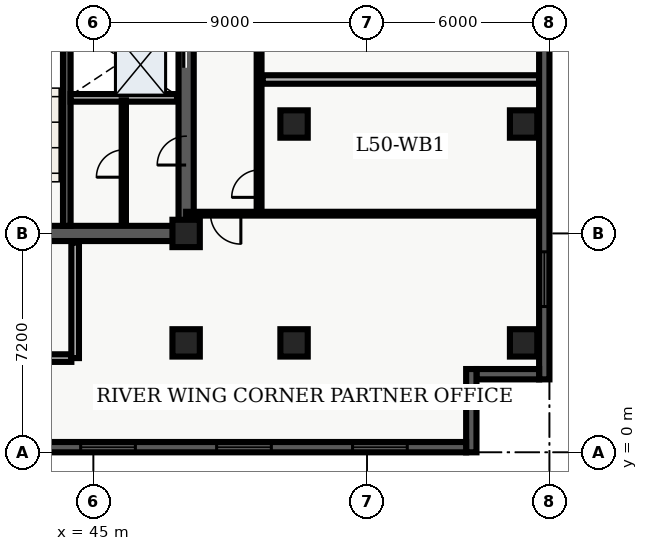
"""IFC4 building model, lengths in metres.
Left out: names, types, materials, properties, quantities, classifications, styles, units other than length and angle.
Written with IfcOpenShell. Run it as: python <this file> out.ifc"""

import sys

from ifc_helpers import new_model, entity, si_unit, converted_unit, direction, frame, origin_with_axes, origin_2d_with_axis, place, context, subcontext, project, spatial, polyline, rectangle, outline, extrude, element, fill, save


model = new_model("IFC4")
c1 = context("Model", 3, precision=1e-05, world=origin_with_axes(), true_north=direction((0.0, 1.0)))
c2 = subcontext(c1, "Body", "Model", "MODEL_VIEW")
j1 = project(units=[si_unit("LENGTHUNIT", "METRE"), converted_unit("PLANEANGLEUNIT", "DEGREE", entity("IfcPlaneAngleMeasure", 0.017), si_unit("PLANEANGLEUNIT", "RADIAN"), dimensions=[0, 0, 0, 0, 0, 0, 0])], contexts=[c1])
p1 = place(None, origin_with_axes())
s1 = spatial("IfcSite", under=j1, at=p1, CompositionType="ELEMENT")
p2 = place(p1, origin_with_axes())
s2 = spatial("IfcBuilding", under=s1, at=p2, CompositionType="ELEMENT")
p3 = place(p2, frame((0.0, 0.0, 204.3), z_axis=(0.0, 0.0, 1.0), x_axis=(1.0, 0.0, 0.0)))
s3 = spatial("IfcBuildingStorey", under=s2, at=p3, CompositionType="ELEMENT", Elevation=204.3)
p4 = place(p3, frame((40.2, 7.2, 0.0), z_axis=(0.0, 0.0, 1.0), x_axis=(1.0, 0.0, 0.0)))
e1 = element("IfcWall", 1, at=p4, inside=s3, PredefinedType="SHEAR", context=c2, shape_type="SweptSolid", body=[
    extrude(outline(polyline([(0.0, -0.25), (7.85, -0.25), (7.85, 0.25), (0.0, 0.25), (0.0, -0.25)])), origin_with_axes(), (0.0, 0.0, 1.0), 3.66),
])
p5 = place(p4, frame((2.175, 0.0, 0.0), z_axis=(0.0, 0.0, 1.0), x_axis=(1.0, 0.0, 0.0)))
e2 = element("IfcOpeningElement", 2, at=p5, cuts=e1, PredefinedType="OPENING", context=c2, shape_type="SweptSolid", body=[
    extrude(rectangle(XDim=1.05, YDim=0.52, at=origin_2d_with_axis()), origin_with_axes(), (0.0, 0.0, 1.0), 2.15),
])
p6 = place(p3, frame((48.05, 7.2, 0.0), z_axis=(0.0, 0.0, 1.0), x_axis=(0.0, 1.0, 0.0)))
e3 = element("IfcWall", 3, at=p6, inside=s3, PredefinedType="SHEAR", context=c2, shape_type="SweptSolid", body=[
    extrude(outline(polyline([(0.0, -0.25), (15.6, -0.25), (15.6, 0.25), (0.0, 0.25), (0.0, -0.25)])), origin_with_axes(), (0.0, 0.0, 1.0), 3.66),
])
p7 = place(p6, frame((5.975, 0.0, 0.0), z_axis=(0.0, 0.0, 1.0), x_axis=(1.0, 0.0, 0.0)))
e4 = element("IfcOpeningElement", 4, at=p7, cuts=e3, PredefinedType="OPENING", context=c2, shape_type="SweptSolid", body=[
    extrude(rectangle(XDim=1.05, YDim=0.52, at=origin_2d_with_axis()), origin_with_axes(), (0.0, 0.0, 1.0), 2.15),
])
p8 = place(p6, frame((2.725, 0.0, 0.0), z_axis=(0.0, 0.0, 1.0), x_axis=(1.0, 0.0, 0.0)))
e5 = element("IfcOpeningElement", 5, at=p8, cuts=e3, PredefinedType="OPENING", context=c2, shape_type="SweptSolid", body=[
    extrude(rectangle(XDim=0.95, YDim=0.52, at=origin_2d_with_axis()), origin_with_axes(), (0.0, 0.0, 1.0), 2.15),
])
p9 = place(p3, frame((44.125, 7.45, 0.0), z_axis=(0.0, 0.0, 1.0), x_axis=(0.0, 1.0, 0.0)))
e6 = element("IfcWall", 6, at=p9, inside=s3, PredefinedType="SHEAR", context=c2, shape_type="SweptSolid", body=[
    extrude(outline(polyline([(0.0, -0.125), (15.1, -0.125), (15.1, 0.125), (0.0, 0.125), (0.0, -0.125)])), origin_with_axes(), (0.0, 0.0, 1.0), 3.66),
])
p10 = place(p3, frame((40.325, 3.1, 0.0), z_axis=(0.0, 0.0, 1.0), x_axis=(1.0, 0.0, 0.0)))
e7 = element("IfcWall", 7, at=p10, inside=s3, PredefinedType="SOLIDWALL", context=c2, shape_type="SweptSolid", body=[
    extrude(outline(polyline([(0.0, -0.125), (3.95, -0.125), (3.95, 0.125), (0.0, 0.125), (0.0, -0.125)])), origin_with_axes(), (0.0, 0.0, 1.0), 2.7),
])
p11 = place(p3, frame((44.4, 3.1, 0.0), z_axis=(0.0, 0.0, 1.0), x_axis=(0.0, 1.0, 0.0)))
e8 = element("IfcWall", 8, at=p11, inside=s3, PredefinedType="SOLIDWALL", context=c2, shape_type="SweptSolid", body=[
    extrude(outline(polyline([(0.0, -0.125), (3.8, -0.125), (3.8, 0.125), (0.0, 0.125), (0.0, -0.125)])), origin_with_axes(), (0.0, 0.0, 1.0), 2.7),
])
for number, where, z_axis, x_axis in (
    (9, (48.05, 3.6, 0.0), (0.0, 0.0, 1.0), (1.0, 0.0, 0.0)),
    (10, (48.05, 7.2, 0.0), (0.0, 0.0, 1.0), (1.0, 0.0, 0.0)),
    (11, (51.6, 3.6, 0.0), (0.0, 0.0, 1.0), (1.0, 0.0, 0.0)),
    (12, (51.6, 10.8, 0.0), (0.0, 0.0, 1.0), (1.0, 0.0, 0.0)),
    (13, (59.15, 3.6, 0.0), (0.0, 0.0, 1.0), (1.0, 0.0, 0.0)),
    (14, (59.15, 10.8, 0.0), (0.0, 0.0, 1.0), (1.0, 0.0, 0.0)),
):
    element("IfcColumn", number, at=place(p3, frame(where, z_axis=z_axis, x_axis=x_axis)), inside=s3, PredefinedType="COLUMN", context=c2, shape_type="SweptSolid", body=[
        extrude(rectangle(XDim=0.9, YDim=0.9, at=origin_2d_with_axis()), origin_with_axes(), (0.0, 0.0, 1.0), 3.9),
    ])
p12 = place(p3, frame((44.25, 11.66, 0.0), z_axis=(0.0, 0.0, 1.0), x_axis=(1.0, 0.0, 0.0)))
e15 = element("IfcWall", 15, at=p12, inside=s3, PredefinedType="SOLIDWALL", context=c2, shape_type="SweptSolid", body=[
    extrude(outline(polyline([(0.0, -0.125), (3.5, -0.125), (3.5, 0.125), (0.0, 0.125), (0.0, -0.125)])), origin_with_axes(), (0.0, 0.0, 1.0), 2.7),
])
p13 = place(p3, frame((46.0, 7.5, 0.0), z_axis=(0.0, 0.0, 1.0), x_axis=(0.0, 1.0, 0.0)))
e16 = element("IfcWall", 16, at=p13, inside=s3, PredefinedType="PARTITIONING", context=c2, shape_type="SweptSolid", body=[
    extrude(outline(polyline([(0.0, -0.07), (4.08, -0.07), (4.08, 0.07), (0.0, 0.07), (0.0, -0.07)])), origin_with_axes(), (0.0, 0.0, 1.0), 2.7),
])
p14 = place(p13, frame((2.0, 0.0, 0.0), z_axis=(0.0, 0.0, 1.0), x_axis=(1.0, 0.0, 0.0)))
e17 = element("IfcOpeningElement", 17, at=p14, cuts=e16, PredefinedType="OPENING", context=c2, shape_type="SweptSolid", body=[
    extrude(rectangle(XDim=0.9, YDim=0.16, at=origin_2d_with_axis()), origin_with_axes(), (0.0, 0.0, 1.0), 2.15),
])
p15 = place(p3, frame((50.45, 7.85, 0.0), z_axis=(0.0, 0.0, 1.0), x_axis=(0.0, 1.0, 0.0)))
e18 = element("IfcWall", 18, at=p15, inside=s3, PredefinedType="PARTITIONING", context=c2, shape_type="SweptSolid", body=[
    extrude(outline(polyline([(0.0, -0.08), (18.8, -0.08), (18.8, 0.08), (0.0, 0.08), (0.0, -0.08)])), origin_with_axes(), (0.0, 0.0, 1.0), 2.7),
])
p16 = place(p15, frame((0.987, 0.0, 0.0), z_axis=(0.0, 0.0, 1.0), x_axis=(1.0, 0.0, 0.0)))
e19 = element("IfcOpeningElement", 19, at=p16, cuts=e18, PredefinedType="OPENING", context=c2, shape_type="SweptSolid", body=[
    extrude(rectangle(XDim=0.9, YDim=0.18, at=origin_2d_with_axis()), origin_with_axes(), (0.0, 0.0, 1.0), 2.15),
])
p17 = place(p15, frame((6.94, 0.0, 0.0), z_axis=(0.0, 0.0, 1.0), x_axis=(1.0, 0.0, 0.0)))
e20 = element("IfcOpeningElement", 20, at=p17, cuts=e18, PredefinedType="OPENING", context=c2, shape_type="SweptSolid", body=[
    extrude(rectangle(XDim=1.0, YDim=0.18, at=origin_2d_with_axis()), origin_with_axes(), (0.0, 0.0, 1.0), 2.15),
])
p18 = place(p15, frame((12.38, 0.0, 0.0), z_axis=(0.0, 0.0, 1.0), x_axis=(1.0, 0.0, 0.0)))
e21 = element("IfcOpeningElement", 21, at=p18, cuts=e18, PredefinedType="OPENING", context=c2, shape_type="SweptSolid", body=[
    extrude(rectangle(XDim=1.0, YDim=0.18, at=origin_2d_with_axis()), origin_with_axes(), (0.0, 0.0, 1.0), 2.15),
])
p19 = place(p15, frame((17.576, 0.0, 0.0), z_axis=(0.0, 0.0, 1.0), x_axis=(1.0, 0.0, 0.0)))
e22 = element("IfcOpeningElement", 22, at=p19, cuts=e18, PredefinedType="OPENING", context=c2, shape_type="SweptSolid", body=[
    extrude(rectangle(XDim=1.0, YDim=0.18, at=origin_2d_with_axis()), origin_with_axes(), (0.0, 0.0, 1.0), 2.15),
])
p20 = place(p3, frame((59.665, 7.85, 0.0), z_axis=(0.0, 0.0, 1.0), x_axis=(-1.0, 0.0, 0.0)))
e23 = element("IfcWall", 23, at=p20, inside=s3, PredefinedType="PARTITIONING", context=c2, shape_type="SweptSolid", body=[
    extrude(outline(polyline([(0.0, -0.062), (11.615, -0.062), (11.615, 0.062), (0.0, 0.062), (0.0, -0.062)])), origin_with_axes(), (0.0, 0.0, 1.0), 2.7),
])
p21 = place(p20, frame((10.315, 0.0, 0.0), z_axis=(0.0, 0.0, 1.0), x_axis=(1.0, 0.0, 0.0)))
e24 = element("IfcOpeningElement", 24, at=p21, cuts=e23, PredefinedType="OPENING", context=c2, shape_type="SweptSolid", body=[
    extrude(rectangle(XDim=1.0, YDim=0.145, at=origin_2d_with_axis()), origin_with_axes(), (0.0, 0.0, 1.0), 2.15),
])
p22 = place(p3, frame((50.57, 12.264, 0.0), z_axis=(0.0, 0.0, 1.0), x_axis=(1.0, 0.0, 0.0)))
e25 = element("IfcWall", 25, at=p22, inside=s3, PredefinedType="PARTITIONING", context=c2, shape_type="SweptSolid", body=[
    extrude(outline(polyline([(0.0, -0.14), (9.095, -0.14), (9.095, 0.14), (0.0, 0.14), (0.0, -0.14)])), origin_with_axes(), (0.0, 0.0, 1.0), 2.7),
])
p23 = place(p3, frame((59.83, 26.06, 0.0), z_axis=(0.0, 0.0, 1.0), x_axis=(0.0, -1.0, 0.0)))
e26 = element("IfcWall", 26, at=p23, inside=s3, PredefinedType="SOLIDWALL", context=c2, shape_type="SweptSolid", body=[
    extrude(outline(polyline([(0.0, -0.17), (23.66, -0.17), (23.66, 0.17), (0.0, 0.17), (0.0, -0.17)])), origin_with_axes(), (0.0, 0.0, 1.0), 3.66),
])
p24 = place(p23, frame((11.83, 0.0, 0.45), z_axis=(0.0, 0.0, 1.0), x_axis=(1.0, 0.0, 0.0)))
e27 = element("IfcOpeningElement", 27, at=p24, cuts=e26, PredefinedType="OPENING", context=c2, shape_type="SweptSolid", body=[
    extrude(rectangle(XDim=1.8, YDim=0.36, at=origin_2d_with_axis()), origin_with_axes(), (0.0, 0.0, 1.0), 2.1),
])
p25 = place(p23, frame((20.364, 0.0, 0.45), z_axis=(0.0, 0.0, 1.0), x_axis=(1.0, 0.0, 0.0)))
e28 = element("IfcOpeningElement", 28, at=p25, cuts=e26, PredefinedType="OPENING", context=c2, shape_type="SweptSolid", body=[
    extrude(rectangle(XDim=1.8, YDim=0.36, at=origin_2d_with_axis()), origin_with_axes(), (0.0, 0.0, 1.0), 2.1),
])
p26 = place(p3, frame((59.66, 2.57, 0.0), z_axis=(0.0, 0.0, 1.0), x_axis=(-1.0, 0.0, 0.0)))
e29 = element("IfcWall", 29, at=p26, inside=s3, PredefinedType="SOLIDWALL", context=c2, shape_type="SweptSolid", body=[
    extrude(outline(polyline([(0.0, -0.17), (2.06, -0.17), (2.06, 0.17), (0.0, 0.17), (0.0, -0.17)])), origin_with_axes(), (0.0, 0.0, 1.0), 3.66),
])
p27 = place(p3, frame((57.43, 2.74, 0.0), z_axis=(0.0, 0.0, 1.0), x_axis=(0.0, -1.0, 0.0)))
e30 = element("IfcWall", 30, at=p27, inside=s3, PredefinedType="SOLIDWALL", context=c2, shape_type="SweptSolid", body=[
    extrude(outline(polyline([(0.0, -0.17), (2.74, -0.17), (2.74, 0.17), (0.0, 0.17), (0.0, -0.17)])), origin_with_axes(), (0.0, 0.0, 1.0), 3.66),
])
p28 = place(p3, frame((57.26, 0.17, 0.0), z_axis=(0.0, 0.0, 1.0), x_axis=(-1.0, 0.0, 0.0)))
e31 = element("IfcWall", 31, at=p28, inside=s3, PredefinedType="SOLIDWALL", context=c2, shape_type="SweptSolid", body=[
    extrude(outline(polyline([(0.0, -0.17), (54.86, -0.17), (54.86, 0.17), (0.0, 0.17), (0.0, -0.17)])), origin_with_axes(), (0.0, 0.0, 1.0), 3.66),
])
p29 = place(p28, frame((2.836, 0.0, 0.45), z_axis=(0.0, 0.0, 1.0), x_axis=(1.0, 0.0, 0.0)))
e32 = element("IfcOpeningElement", 32, at=p29, cuts=e31, PredefinedType="OPENING", context=c2, shape_type="SweptSolid", body=[
    extrude(rectangle(XDim=1.8, YDim=0.36, at=origin_2d_with_axis()), origin_with_axes(), (0.0, 0.0, 1.0), 2.1),
])
p30 = place(p28, frame((7.307, 0.0, 0.45), z_axis=(0.0, 0.0, 1.0), x_axis=(1.0, 0.0, 0.0)))
e33 = element("IfcOpeningElement", 33, at=p30, cuts=e31, PredefinedType="OPENING", context=c2, shape_type="SweptSolid", body=[
    extrude(rectangle(XDim=1.8, YDim=0.36, at=origin_2d_with_axis()), origin_with_axes(), (0.0, 0.0, 1.0), 2.1),
])
p31 = place(p28, frame((11.779, 0.0, 0.45), z_axis=(0.0, 0.0, 1.0), x_axis=(1.0, 0.0, 0.0)))
e34 = element("IfcOpeningElement", 34, at=p31, cuts=e31, PredefinedType="OPENING", context=c2, shape_type="SweptSolid", body=[
    extrude(rectangle(XDim=1.8, YDim=0.36, at=origin_2d_with_axis()), origin_with_axes(), (0.0, 0.0, 1.0), 2.1),
])
p32 = place(p28, frame((16.251, 0.0, 0.45), z_axis=(0.0, 0.0, 1.0), x_axis=(1.0, 0.0, 0.0)))
e35 = element("IfcOpeningElement", 35, at=p32, cuts=e31, PredefinedType="OPENING", context=c2, shape_type="SweptSolid", body=[
    extrude(rectangle(XDim=1.8, YDim=0.36, at=origin_2d_with_axis()), origin_with_axes(), (0.0, 0.0, 1.0), 2.1),
])
p33 = place(p28, frame((20.723, 0.0, 0.45), z_axis=(0.0, 0.0, 1.0), x_axis=(1.0, 0.0, 0.0)))
e36 = element("IfcOpeningElement", 36, at=p33, cuts=e31, PredefinedType="OPENING", context=c2, shape_type="SweptSolid", body=[
    extrude(rectangle(XDim=1.8, YDim=0.36, at=origin_2d_with_axis()), origin_with_axes(), (0.0, 0.0, 1.0), 2.1),
])
p34 = place(p28, frame((25.194, 0.0, 0.45), z_axis=(0.0, 0.0, 1.0), x_axis=(1.0, 0.0, 0.0)))
e37 = element("IfcOpeningElement", 37, at=p34, cuts=e31, PredefinedType="OPENING", context=c2, shape_type="SweptSolid", body=[
    extrude(rectangle(XDim=1.8, YDim=0.36, at=origin_2d_with_axis()), origin_with_axes(), (0.0, 0.0, 1.0), 2.1),
])
p35 = place(p28, frame((29.666, 0.0, 0.45), z_axis=(0.0, 0.0, 1.0), x_axis=(1.0, 0.0, 0.0)))
e38 = element("IfcOpeningElement", 38, at=p35, cuts=e31, PredefinedType="OPENING", context=c2, shape_type="SweptSolid", body=[
    extrude(rectangle(XDim=1.8, YDim=0.36, at=origin_2d_with_axis()), origin_with_axes(), (0.0, 0.0, 1.0), 2.1),
])
p36 = place(p28, frame((34.138, 0.0, 0.45), z_axis=(0.0, 0.0, 1.0), x_axis=(1.0, 0.0, 0.0)))
e39 = element("IfcOpeningElement", 39, at=p36, cuts=e31, PredefinedType="OPENING", context=c2, shape_type="SweptSolid", body=[
    extrude(rectangle(XDim=1.8, YDim=0.36, at=origin_2d_with_axis()), origin_with_axes(), (0.0, 0.0, 1.0), 2.1),
])
p37 = place(p28, frame((38.609, 0.0, 0.45), z_axis=(0.0, 0.0, 1.0), x_axis=(1.0, 0.0, 0.0)))
e40 = element("IfcOpeningElement", 40, at=p37, cuts=e31, PredefinedType="OPENING", context=c2, shape_type="SweptSolid", body=[
    extrude(rectangle(XDim=1.8, YDim=0.36, at=origin_2d_with_axis()), origin_with_axes(), (0.0, 0.0, 1.0), 2.1),
])
p38 = place(p28, frame((43.081, 0.0, 0.45), z_axis=(0.0, 0.0, 1.0), x_axis=(1.0, 0.0, 0.0)))
e41 = element("IfcOpeningElement", 41, at=p38, cuts=e31, PredefinedType="OPENING", context=c2, shape_type="SweptSolid", body=[
    extrude(rectangle(XDim=1.8, YDim=0.36, at=origin_2d_with_axis()), origin_with_axes(), (0.0, 0.0, 1.0), 2.1),
])
p39 = place(p28, frame((47.553, 0.0, 0.45), z_axis=(0.0, 0.0, 1.0), x_axis=(1.0, 0.0, 0.0)))
e42 = element("IfcOpeningElement", 42, at=p39, cuts=e31, PredefinedType="OPENING", context=c2, shape_type="SweptSolid", body=[
    extrude(rectangle(XDim=1.8, YDim=0.36, at=origin_2d_with_axis()), origin_with_axes(), (0.0, 0.0, 1.0), 2.1),
])
p40 = place(p28, frame((52.024, 0.0, 0.45), z_axis=(0.0, 0.0, 1.0), x_axis=(1.0, 0.0, 0.0)))
e43 = element("IfcOpeningElement", 43, at=p40, cuts=e31, PredefinedType="OPENING", context=c2, shape_type="SweptSolid", body=[
    extrude(rectangle(XDim=1.8, YDim=0.36, at=origin_2d_with_axis()), origin_with_axes(), (0.0, 0.0, 1.0), 2.1),
])
p41 = place(p6, frame((5.975, 0.0, 0.0), z_axis=(0.0, 0.0, 1.0), x_axis=(1.0, 0.0, 0.0)))
e44 = element("IfcDoor", 44, at=p41, inside=s3, OperationType="SLIDING_TO_LEFT", PredefinedType="DOOR", context=c2, shape_type="SweptSolid", body=[
    extrude(rectangle(XDim=1.05, YDim=0.09, at=origin_2d_with_axis()), origin_with_axes(), (0.0, 0.0, 1.0), 2.15),
])
fill(e4, e44)
p42 = place(p13, frame((2.0, 0.0, 0.0), z_axis=(0.0, 0.0, 1.0), x_axis=(1.0, 0.0, 0.0)))
e45 = element("IfcDoor", 45, at=p42, inside=s3, OperationType="SINGLE_SWING_LEFT", PredefinedType="DOOR", context=c2, shape_type="SweptSolid", body=[
    extrude(rectangle(XDim=0.9, YDim=0.084, at=origin_2d_with_axis()), origin_with_axes(), (0.0, 0.0, 1.0), 2.15),
])
fill(e17, e45)
p43 = place(p6, frame((2.725, 0.0, 0.0), z_axis=(0.0, 0.0, 1.0), x_axis=(1.0, 0.0, 0.0)))
e46 = element("IfcDoor", 46, at=p43, inside=s3, OperationType="SINGLE_SWING_LEFT", PredefinedType="DOOR", context=c2, shape_type="SweptSolid", body=[
    extrude(rectangle(XDim=0.95, YDim=0.09, at=origin_2d_with_axis()), origin_with_axes(), (0.0, 0.0, 1.0), 2.15),
])
fill(e5, e46)
p44 = place(p20, frame((10.315, 0.0, 0.0), z_axis=(0.0, 0.0, 1.0), x_axis=(1.0, 0.0, 0.0)))
e47 = element("IfcDoor", 47, at=p44, inside=s3, OperationType="SINGLE_SWING_LEFT", PredefinedType="DOOR", context=c2, shape_type="SweptSolid", body=[
    extrude(rectangle(XDim=1.0, YDim=0.075, at=origin_2d_with_axis()), origin_with_axes(), (0.0, 0.0, 1.0), 2.15),
])
fill(e24, e47)
p45 = place(p15, frame((0.987, 0.0, 0.0), z_axis=(0.0, 0.0, 1.0), x_axis=(1.0, 0.0, 0.0)))
e48 = element("IfcDoor", 48, at=p45, inside=s3, OperationType="SINGLE_SWING_LEFT", PredefinedType="DOOR", context=c2, shape_type="SweptSolid", body=[
    extrude(rectangle(XDim=0.9, YDim=0.09, at=origin_2d_with_axis()), origin_with_axes(), (0.0, 0.0, 1.0), 2.15),
])
fill(e19, e48)
p46 = place(p23, frame((20.364, 0.0, 0.45), z_axis=(0.0, 0.0, 1.0), x_axis=(1.0, 0.0, 0.0)))
e49 = element("IfcWindow", 49, at=p46, inside=s3, PredefinedType="WINDOW", context=c2, shape_type="SweptSolid", body=[
    extrude(rectangle(XDim=1.8, YDim=0.09, at=origin_2d_with_axis()), origin_with_axes(), (0.0, 0.0, 1.0), 2.1),
])
fill(e28, e49)
p47 = place(p28, frame((2.836, 0.0, 0.45), z_axis=(0.0, 0.0, 1.0), x_axis=(1.0, 0.0, 0.0)))
e50 = element("IfcWindow", 50, at=p47, inside=s3, PredefinedType="WINDOW", context=c2, shape_type="SweptSolid", body=[
    extrude(rectangle(XDim=1.8, YDim=0.09, at=origin_2d_with_axis()), origin_with_axes(), (0.0, 0.0, 1.0), 2.1),
])
fill(e32, e50)
p48 = place(p28, frame((7.307, 0.0, 0.45), z_axis=(0.0, 0.0, 1.0), x_axis=(1.0, 0.0, 0.0)))
e51 = element("IfcWindow", 51, at=p48, inside=s3, PredefinedType="WINDOW", context=c2, shape_type="SweptSolid", body=[
    extrude(rectangle(XDim=1.8, YDim=0.09, at=origin_2d_with_axis()), origin_with_axes(), (0.0, 0.0, 1.0), 2.1),
])
fill(e33, e51)
p49 = place(p28, frame((11.779, 0.0, 0.45), z_axis=(0.0, 0.0, 1.0), x_axis=(1.0, 0.0, 0.0)))
e52 = element("IfcWindow", 52, at=p49, inside=s3, PredefinedType="WINDOW", context=c2, shape_type="SweptSolid", body=[
    extrude(rectangle(XDim=1.8, YDim=0.09, at=origin_2d_with_axis()), origin_with_axes(), (0.0, 0.0, 1.0), 2.1),
])
fill(e34, e52)
save(model, sys.argv[1])
